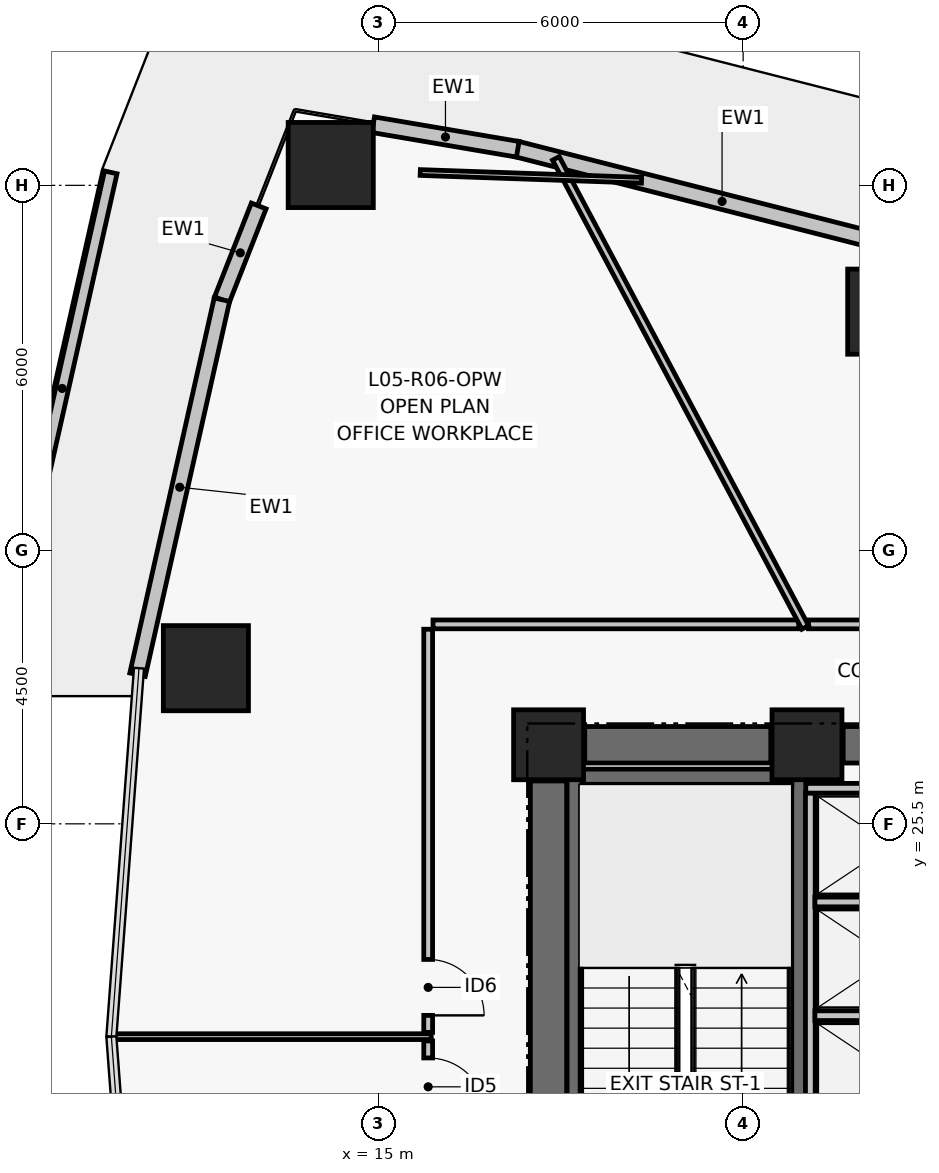
"""IFC4 building model, lengths in metres.
Left out: names, types, materials, properties, quantities, classifications, styles, units other than length and angle.
Written with IfcOpenShell. Run it as: python <this file> out.ifc"""

import sys

from ifc_helpers import new_model, si_unit, direction, frame, frame_2d, origin, origin_2d, place, context, subcontext, project, spatial, rectangle, hollow_rectangle, extrude, element, fill, save


model = new_model("IFC4")
c1 = context("Model", 3, precision=1e-05, world=origin(), true_north=direction((0.0, 1.0)))
c2 = subcontext(c1, "Body", "Model", "MODEL_VIEW")
j1 = project(units=[si_unit("LENGTHUNIT", "METRE"), si_unit("PLANEANGLEUNIT", "RADIAN")], contexts=[c1])
p1 = place(None, origin())
s1 = spatial("IfcSite", under=j1, at=p1, CompositionType="ELEMENT")
p2 = place(p1, origin())
s2 = spatial("IfcBuilding", under=s1, at=p2, CompositionType="ELEMENT")
p3 = place(p2, frame((0.0, 0.0, 27.6)))
s3 = spatial("IfcBuildingStorey", under=s2, at=p3, CompositionType="ELEMENT", Elevation=27.6)
for number, where, z_axis, x_axis in (
    (1, (17.8, 26.8, 0.0), (0.0, 0.0, 1.0), (1.0, 0.0, 0.0)),
    (2, (22.05, 26.8, 0.0), (0.0, 0.0, 1.0), (1.0, 0.0, 0.0)),
):
    element("IfcColumn", number, at=place(p3, frame(where, z_axis=z_axis, x_axis=x_axis)), inside=s3, PredefinedType="COLUMN", context=c2, shape_type="SweptSolid", body=[
        extrude(rectangle(XDim=1.15, YDim=1.15, at=origin_2d()), origin(), (0.0, 0.0, 1.0), 3.72),
    ])
p4 = place(p3, frame((18.395, 26.8, 0.0), z_axis=(0.0, 0.0, 1.0), x_axis=(1.0, 0.0, 0.0)))
e3 = element("IfcWall", 3, at=p4, inside=s3, PredefinedType="SHEAR", context=c2, shape_type="SweptSolid", body=[
    extrude(rectangle(XDim=3.06, YDim=0.6, at=frame_2d((1.53, 0.0))), origin(), (0.0, 0.0, 1.0), 3.47),
])
p5 = place(p3, frame((22.645, 26.8, 0.0), z_axis=(0.0, 0.0, 1.0), x_axis=(1.0, 0.0, 0.0)))
e4 = element("IfcWall", 4, at=p5, inside=s3, PredefinedType="SHEAR", context=c2, shape_type="SweptSolid", body=[
    extrude(rectangle(XDim=1.705, YDim=0.6, at=frame_2d((0.853, 0.0))), origin(), (0.0, 0.0, 1.0), 3.47),
])
p6 = place(p3, frame((17.8, 17.795, 0.0), z_axis=(0.0, 0.0, 1.0), x_axis=(0.0, 1.0, 0.0)))
e5 = element("IfcWall", 5, at=p6, inside=s3, PredefinedType="SHEAR", context=c2, shape_type="SweptSolid", body=[
    extrude(rectangle(XDim=8.41, YDim=0.6, at=frame_2d((4.205, 0.0))), origin(), (0.0, 0.0, 1.0), 3.47),
])
p7 = place(p3, frame((18.229, 17.6, 0.0), z_axis=(0.0, 0.0, 1.0), x_axis=(0.0, 1.0, 0.0)))
e6 = element("IfcWall", 6, at=p7, inside=s3, PredefinedType="SHEAR", context=c2, shape_type="SweptSolid", body=[
    extrude(rectangle(XDim=8.8, YDim=0.25, at=frame_2d((4.4, 0.0))), origin(), (0.0, 0.0, 1.0), 3.47),
])
p8 = place(p3, frame((21.925, 17.6, 0.0), z_axis=(0.0, 0.0, 1.0), x_axis=(0.0, 1.0, 0.0)))
e7 = element("IfcWall", 7, at=p8, inside=s3, PredefinedType="SHEAR", context=c2, shape_type="SweptSolid", body=[
    extrude(rectangle(XDim=8.8, YDim=0.25, at=frame_2d((4.4, 0.0))), origin(), (0.0, 0.0, 1.0), 3.47),
])
p9 = place(p8, frame((0.35, 0.0, 0.0)))
e8 = element("IfcOpeningElement", 8, at=p9, cuts=e7, PredefinedType="OPENING", context=c2, shape_type="SweptSolid", body=[
    extrude(rectangle(XDim=1.05, YDim=2.08, at=frame_2d((0.525, 1.04))), frame((0.0, 0.135, 0.0), z_axis=(0.0, -1.0, 0.0), x_axis=(1.0, 0.0, 0.0)), (0.0, 0.0, 1.0), 0.27),
])
p10 = place(p3, frame((18.354, 26.275, 0.0), z_axis=(0.0, 0.0, 1.0), x_axis=(1.0, 0.0, 0.0)))
e9 = element("IfcWall", 9, at=p10, inside=s3, PredefinedType="SHEAR", context=c2, shape_type="SweptSolid", body=[
    extrude(rectangle(XDim=3.446, YDim=0.25, at=frame_2d((1.723, 0.0))), origin(), (0.0, 0.0, 1.0), 3.47),
])
for number, where, z_axis, x_axis in (
    (10, (23.419, 33.923, 0.0), (0.0, 0.0, 1.0), (1.0, 0.0, 0.0)),
    (11, (14.218, 36.334, 0.0), (0.0, 0.0, 1.0), (1.0, 0.0, 0.0)),
    (12, (12.164, 28.06, 0.0), (0.0, 0.0, 1.0), (1.0, 0.0, 0.0)),
):
    element("IfcColumn", number, at=place(p3, frame(where, z_axis=z_axis, x_axis=x_axis)), inside=s3, PredefinedType="COLUMN", context=c2, shape_type="SweptSolid", body=[
        extrude(hollow_rectangle(XDim=1.4, YDim=1.4, WallThickness=0.055, at=origin_2d()), origin(), (0.0, 0.0, 1.0), 3.72),
    ])
p11 = place(p3, frame((17.282, 36.596, 0.0), z_axis=(0.0, 0.0, 1.0), x_axis=(0.968977974408, -0.247147092057, 0.0)))
e13 = element("IfcWall", 13, at=p11, inside=s3, PredefinedType="PARTITIONING", context=c2, shape_type="SweptSolid", body=[
    extrude(rectangle(XDim=6.959, YDim=0.26, at=frame_2d((3.479, 0.0))), origin(), (0.0, 0.0, 1.0), 3.47),
])
p12 = place(p3, frame((14.915, 36.997, 0.0), z_axis=(0.0, 0.0, 1.0), x_axis=(0.985905469923, -0.167303330437, 0.0)))
e14 = element("IfcWall", 14, at=p12, inside=s3, PredefinedType="PARTITIONING", context=c2, shape_type="SweptSolid", body=[
    extrude(rectangle(XDim=2.412, YDim=0.26, at=frame_2d((1.206, 0.0))), origin(), (0.0, 0.0, 1.0), 3.47),
])
p13 = place(p3, frame((12.427, 34.119, 0.0), z_axis=(0.0, 0.0, 1.0), x_axis=(0.365666052462, 0.930746119023, 0.0)))
e15 = element("IfcWall", 15, at=p13, inside=s3, PredefinedType="PARTITIONING", context=c2, shape_type="SweptSolid", body=[
    extrude(rectangle(XDim=1.656, YDim=0.26, at=frame_2d((0.828, 0.0))), origin(), (0.0, 0.0, 1.0), 3.47),
])
p14 = place(p3, frame((11.04, 27.952, 0.0), z_axis=(0.0, 0.0, 1.0), x_axis=(0.219502085231, 0.975612030768, 0.0)))
e16 = element("IfcWall", 16, at=p14, inside=s3, PredefinedType="PARTITIONING", context=c2, shape_type="SweptSolid", body=[
    extrude(rectangle(XDim=6.321, YDim=0.26, at=frame_2d((3.16, 0.0))), origin(), (0.0, 0.0, 1.0), 3.47),
])
p15 = place(p3, frame((9.001, 29.107, 0.0), z_axis=(0.0, 0.0, 1.0), x_axis=(0.219520170018, 0.975607961712, 0.0)))
e17 = element("IfcWall", 17, at=p15, inside=s3, PredefinedType="PARAPET", context=c2, shape_type="SweptSolid", body=[
    extrude(rectangle(XDim=7.285, YDim=0.21, at=frame_2d((3.642, 0.0))), origin(), (0.0, 0.0, 1.0), 1.15),
])
p16 = place(p3, frame((22.105, 20.56, 0.0), z_axis=(0.0, 0.0, 1.0), x_axis=(0.0, 1.0, 0.0)))
e18 = element("IfcWall", 18, at=p16, inside=s3, PredefinedType="PARTITIONING", context=c2, shape_type="SweptSolid", body=[
    extrude(rectangle(XDim=5.45, YDim=0.16, at=frame_2d((2.725, 0.0))), origin(), (0.0, 0.0, 1.0), 3.47),
])
p17 = place(p3, frame((22.18, 22.345, 0.0), z_axis=(0.0, 0.0, 1.0), x_axis=(1.0, 0.0, 0.0)))
e19 = element("IfcWall", 19, at=p17, inside=s3, PredefinedType="PARTITIONING", context=c2, shape_type="SweptSolid", body=[
    extrude(rectangle(XDim=2.65, YDim=0.16, at=frame_2d((1.325, 0.0))), origin(), (0.0, 0.0, 1.0), 3.47),
])
p18 = place(p3, frame((22.18, 24.215, 0.0), z_axis=(0.0, 0.0, 1.0), x_axis=(1.0, 0.0, 0.0)))
e20 = element("IfcWall", 20, at=p18, inside=s3, PredefinedType="PARTITIONING", context=c2, shape_type="SweptSolid", body=[
    extrude(rectangle(XDim=2.49, YDim=0.16, at=frame_2d((1.245, 0.0))), origin(), (0.0, 0.0, 1.0), 3.47),
])
p19 = place(p3, frame((22.03, 26.085, 0.0), z_axis=(0.0, 0.0, 1.0), x_axis=(1.0, 0.0, 0.0)))
e21 = element("IfcWall", 21, at=p19, inside=s3, PredefinedType="PARTITIONING", context=c2, shape_type="SweptSolid", body=[
    extrude(rectangle(XDim=2.83, YDim=0.16, at=frame_2d((1.415, 0.0))), origin(), (0.0, 0.0, 1.0), 3.47),
])
p20 = place(p3, frame((15.82, 21.93, 0.0), z_axis=(0.0, 0.0, 1.0), x_axis=(0.0, -1.0, 0.0)))
e22 = element("IfcWall", 22, at=p20, inside=s3, PredefinedType="PARTITIONING", context=c2, shape_type="SweptSolid", body=[
    extrude(rectangle(XDim=8.64, YDim=0.145, at=frame_2d((4.32, 0.0))), origin(), (0.0, 0.0, 1.0), 2.6),
])
p21 = place(p20, frame((0.28, 0.0, 0.0)))
e23 = element("IfcOpeningElement", 23, at=p21, cuts=e22, PredefinedType="OPENING", context=c2, shape_type="SweptSolid", body=[
    extrude(rectangle(XDim=0.95, YDim=2.06, at=frame_2d((0.475, 1.03))), frame((0.0, 0.083, 0.0), z_axis=(0.0, -1.0, 0.0), x_axis=(1.0, 0.0, 0.0)), (0.0, 0.0, 1.0), 0.165),
])
p22 = place(p3, frame((29.754, 28.78, 0.0), z_axis=(0.0, 0.0, 1.0), x_axis=(-1.0, 0.0, 0.0)))
e24 = element("IfcWall", 24, at=p22, inside=s3, PredefinedType="PARTITIONING", context=c2, shape_type="SweptSolid", body=[
    extrude(rectangle(XDim=7.68, YDim=0.145, at=frame_2d((3.84, 0.0))), origin(), (0.0, 0.0, 1.0), 2.6),
])
p23 = place(p22, frame((3.365, 0.0, 0.0)))
e25 = element("IfcOpeningElement", 25, at=p23, cuts=e24, PredefinedType="OPENING", context=c2, shape_type="SweptSolid", body=[
    extrude(rectangle(XDim=0.95, YDim=2.06, at=frame_2d((0.475, 1.03))), frame((0.0, 0.083, 0.0), z_axis=(0.0, -1.0, 0.0), x_axis=(1.0, 0.0, 0.0)), (0.0, 0.0, 1.0), 0.165),
])
p24 = place(p3, frame((21.916, 28.78, 0.0), z_axis=(0.0, 0.0, 1.0), x_axis=(-1.0, 0.0, 0.0)))
e26 = element("IfcWall", 26, at=p24, inside=s3, PredefinedType="PARTITIONING", context=c2, shape_type="SweptSolid", body=[
    extrude(rectangle(XDim=6.016, YDim=0.145, at=frame_2d((3.008, 0.0))), origin(), (0.0, 0.0, 1.0), 2.6),
])
p25 = place(p3, frame((15.82, 28.7, 0.0), z_axis=(0.0, 0.0, 1.0), x_axis=(0.0, -1.0, 0.0)))
e27 = element("IfcWall", 27, at=p25, inside=s3, PredefinedType="PARTITIONING", context=c2, shape_type="SweptSolid", body=[
    extrude(rectangle(XDim=6.63, YDim=0.145, at=frame_2d((3.315, 0.0))), origin(), (0.0, 0.0, 1.0), 2.6),
])
p26 = place(p25, frame((5.43, 0.0, 0.0)))
e28 = element("IfcOpeningElement", 28, at=p26, cuts=e27, PredefinedType="OPENING", context=c2, shape_type="SweptSolid", body=[
    extrude(rectangle(XDim=0.92, YDim=2.05, at=frame_2d((0.46, 1.025))), frame((0.0, 0.083, 0.0), z_axis=(0.0, -1.0, 0.0), x_axis=(1.0, 0.0, 0.0)), (0.0, 0.0, 1.0), 0.165),
])
p27 = place(p3, frame((22.021, 28.73, 0.0), z_axis=(0.0, 0.0, 1.0), x_axis=(-0.469465111929, 0.88295102281, 0.0)))
e29 = element("IfcWall", 29, at=p27, inside=s3, PredefinedType="PARTITIONING", context=c2, shape_type="SweptSolid", body=[
    extrude(rectangle(XDim=8.736, YDim=0.125, at=frame_2d((4.368, 0.0))), origin(), (0.0, 0.0, 1.0), 2.85),
])
p28 = place(p3, frame((15.87, 22.0, 0.0), z_axis=(0.0, 0.0, 1.0), x_axis=(-1.0, 0.0, 0.0)))
e30 = element("IfcWall", 30, at=p28, inside=s3, PredefinedType="PARTITIONING", context=c2, shape_type="SweptSolid", body=[
    extrude(rectangle(XDim=5.271, YDim=0.095, at=frame_2d((2.635, 0.0))), origin(), (0.0, 0.0, 1.0), 2.85),
])
p29 = place(p3, frame((19.329, 36.084, 0.0), z_axis=(0.0, 0.0, 1.0), x_axis=(-0.999389725088, 0.03493103762, 0.0)))
e31 = element("IfcWall", 31, at=p29, inside=s3, PredefinedType="PARTITIONING", context=c2, shape_type="SweptSolid", body=[
    extrude(rectangle(XDim=3.641, YDim=0.095, at=frame_2d((1.821, 0.0))), origin(), (0.0, 0.0, 1.0), 3.47),
])
p30 = place(p21, origin())
e32 = element("IfcDoor", 32, at=p30, inside=s3, OperationType="SINGLE_SWING_RIGHT", PredefinedType="DOOR", context=c2, shape_type="SweptSolid", body=[
    extrude(rectangle(XDim=0.95, YDim=2.06, at=frame_2d((0.475, 1.03))), frame((0.0, 0.025, 0.0), z_axis=(0.0, -1.0, 0.0), x_axis=(1.0, 0.0, 0.0)), (0.0, 0.0, 1.0), 0.05),
])
fill(e23, e32)
p31 = place(p26, origin())
e33 = element("IfcDoor", 33, at=p31, inside=s3, OperationType="SINGLE_SWING_RIGHT", PredefinedType="DOOR", context=c2, shape_type="SweptSolid", body=[
    extrude(rectangle(XDim=0.92, YDim=2.05, at=frame_2d((0.46, 1.025))), frame((0.0, 0.025, 0.0), z_axis=(0.0, -1.0, 0.0), x_axis=(1.0, 0.0, 0.0)), (0.0, 0.0, 1.0), 0.05),
])
fill(e28, e33)
save(model, sys.argv[1])
